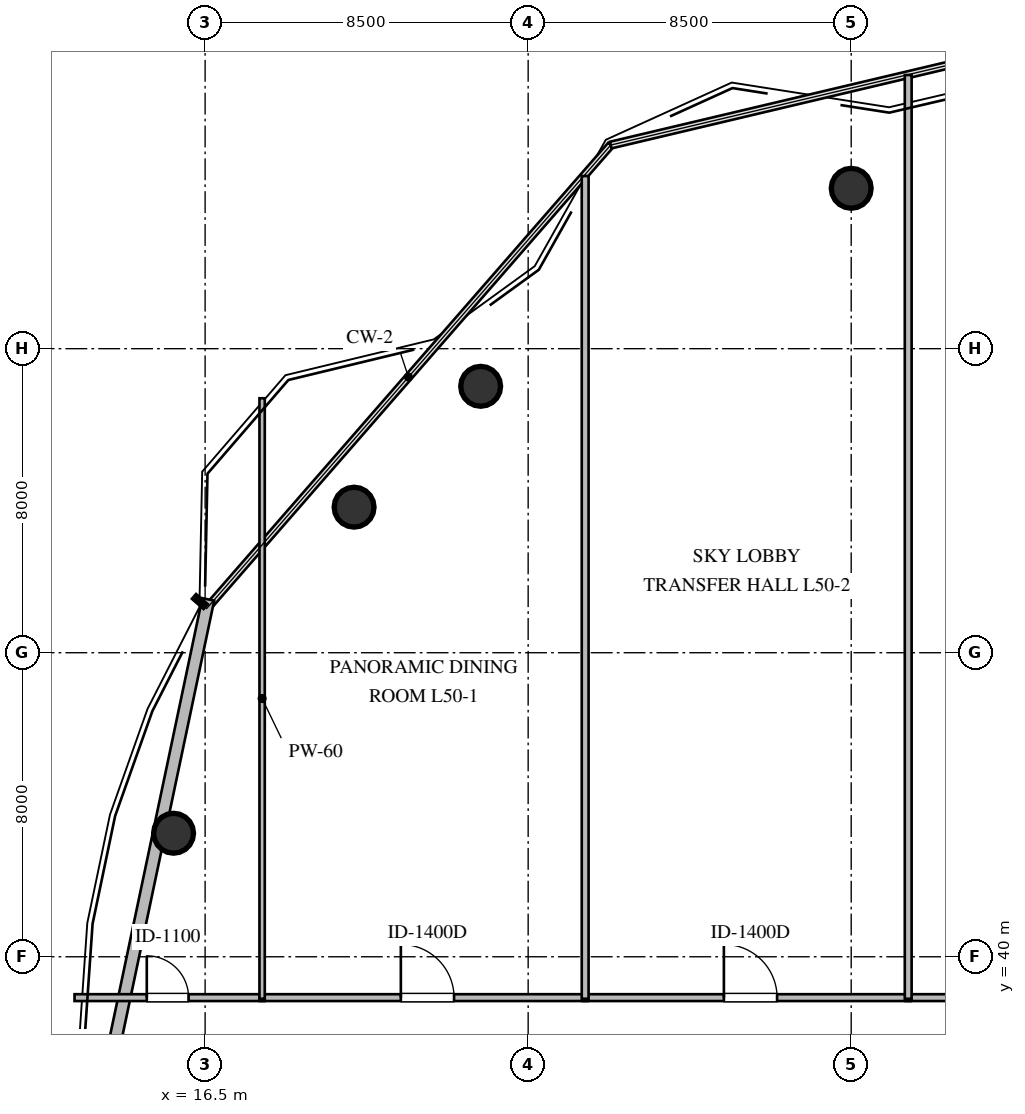
"""IFC4 building model, lengths in metres.
Left out: names, types, materials, properties, quantities, classifications, styles, units other than length and angle.
Written with IfcOpenShell. Run it as: python <this file> out.ifc"""

import sys

from ifc_helpers import new_model, si_unit, direction, frame, frame_2d, origin, origin_2d, place, context, subcontext, project, spatial, rectangle, circle, extrude, element, fill, save


model = new_model("IFC4")
c1 = context("Model", 3, precision=1e-05, world=origin(), true_north=direction((0.0, 1.0)))
c2 = subcontext(c1, "Body", "Model", "MODEL_VIEW")
j1 = project(units=[si_unit("LENGTHUNIT", "METRE"), si_unit("PLANEANGLEUNIT", "RADIAN")], contexts=[c1])
p1 = place(None, origin())
s1 = spatial("IfcSite", under=j1, at=p1, CompositionType="ELEMENT")
p2 = place(p1, origin())
s2 = spatial("IfcBuilding", under=s1, at=p2, CompositionType="ELEMENT")
p3 = place(p2, frame((0.0, 0.0, 190.8)))
s3 = spatial("IfcBuildingStorey", under=s2, at=p3, CompositionType="ELEMENT", Elevation=190.8)
for number, where, z_axis, x_axis in (
    (1, (33.5, 60.22, 0.0), (0.0, 0.0, 1.0), (1.0, 0.0, 0.0)),
    (2, (23.75, 55.01, 0.0), (0.0, 0.0, 1.0), (1.0, 0.0, 0.0)),
    (3, (20.42, 51.83, 0.0), (0.0, 0.0, 1.0), (1.0, 0.0, 0.0)),
    (4, (15.67, 43.25, 0.0), (0.0, 0.0, 1.0), (1.0, 0.0, 0.0)),
):
    element("IfcColumn", number, at=place(p3, frame(where, z_axis=z_axis, x_axis=x_axis)), inside=s3, PredefinedType="COLUMN", context=c2, shape_type="SweptSolid", body=[
        extrude(circle(Radius=0.525, at=origin_2d()), origin(), (0.0, 0.0, 1.0), 4.8),
    ])
p4 = place(p3, frame((13.525, 34.903, 0.0), z_axis=(0.0, 0.0, 1.0), x_axis=(0.206301080321, 0.978488561128, 0.0)))
e5 = element("IfcWall", 5, at=p4, inside=s3, PredefinedType="STANDARD", context=c2, shape_type="SweptSolid", body=[
    extrude(rectangle(XDim=14.819, YDim=0.32, at=frame_2d((7.409, 0.0))), origin(), (0.0, 0.0, 1.0), 4.006),
])
p5 = place(p3, frame((13.064, 38.925, 0.0), z_axis=(0.0, 0.0, 1.0), x_axis=(1.0, 0.0, 0.0)))
e6 = element("IfcWall", 6, at=p5, inside=s3, PredefinedType="PARTITIONING", context=c2, shape_type="SweptSolid", body=[
    extrude(rectangle(XDim=5.001, YDim=0.18, at=frame_2d((2.5, 0.0))), origin(), (0.0, 0.0, 1.0), 4.56),
])
p6 = place(p5, frame((1.901, 0.0, 0.0)))
e7 = element("IfcOpeningElement", 7, at=p6, cuts=e6, PredefinedType="OPENING", context=c2, shape_type="SweptSolid", body=[
    extrude(rectangle(XDim=1.1, YDim=2.1, at=frame_2d((0.55, 1.05))), frame((0.0, 0.1, 0.0), z_axis=(0.0, -1.0, 0.0), x_axis=(1.0, 0.0, 0.0)), (0.0, 0.0, 1.0), 0.2),
])
p7 = place(p3, frame((17.935, 38.925, 0.0), z_axis=(0.0, 0.0, 1.0), x_axis=(1.0, 0.0, 0.0)))
e8 = element("IfcWall", 8, at=p7, inside=s3, PredefinedType="PARTITIONING", context=c2, shape_type="SweptSolid", body=[
    extrude(rectangle(XDim=8.63, YDim=0.18, at=frame_2d((4.315, 0.0))), origin(), (0.0, 0.0, 1.0), 4.56),
])
p8 = place(p7, frame((3.715, 0.0, 0.0)))
e9 = element("IfcOpeningElement", 9, at=p8, cuts=e8, PredefinedType="OPENING", context=c2, shape_type="SweptSolid", body=[
    extrude(rectangle(XDim=1.4, YDim=2.15, at=frame_2d((0.7, 1.075))), frame((0.0, 0.1, 0.0), z_axis=(0.0, -1.0, 0.0), x_axis=(1.0, 0.0, 0.0)), (0.0, 0.0, 1.0), 0.2),
])
p9 = place(p3, frame((26.435, 38.925, 0.0), z_axis=(0.0, 0.0, 1.0), x_axis=(1.0, 0.0, 0.0)))
e10 = element("IfcWall", 10, at=p9, inside=s3, PredefinedType="PARTITIONING", context=c2, shape_type="SweptSolid", body=[
    extrude(rectangle(XDim=8.63, YDim=0.18, at=frame_2d((4.315, 0.0))), origin(), (0.0, 0.0, 1.0), 4.56),
])
p10 = place(p9, frame((3.715, 0.0, 0.0)))
e11 = element("IfcOpeningElement", 11, at=p10, cuts=e10, PredefinedType="OPENING", context=c2, shape_type="SweptSolid", body=[
    extrude(rectangle(XDim=1.4, YDim=2.15, at=frame_2d((0.7, 1.075))), frame((0.0, 0.1, 0.0), z_axis=(0.0, -1.0, 0.0), x_axis=(1.0, 0.0, 0.0)), (0.0, 0.0, 1.0), 0.2),
])
p11 = place(p3, frame((34.935, 38.925, 0.0), z_axis=(0.0, 0.0, 1.0), x_axis=(1.0, 0.0, 0.0)))
e12 = element("IfcWall", 12, at=p11, inside=s3, PredefinedType="PARTITIONING", context=c2, shape_type="SweptSolid", body=[
    extrude(rectangle(XDim=8.63, YDim=0.18, at=frame_2d((4.315, 0.0))), origin(), (0.0, 0.0, 1.0), 4.56),
])
p12 = place(p11, frame((3.715, 0.0, 0.0)))
e13 = element("IfcOpeningElement", 13, at=p12, cuts=e12, PredefinedType="OPENING", context=c2, shape_type="SweptSolid", body=[
    extrude(rectangle(XDim=1.1, YDim=2.1, at=frame_2d((0.55, 1.05))), frame((0.0, 0.1, 0.0), z_axis=(0.0, -1.0, 0.0), x_axis=(1.0, 0.0, 0.0)), (0.0, 0.0, 1.0), 0.2),
])
p13 = place(p3, frame((18.0, 54.696, 0.0), z_axis=(0.0, 0.0, 1.0), x_axis=(0.0, -1.0, 0.0)))
e14 = element("IfcWall", 14, at=p13, inside=s3, PredefinedType="PARTITIONING", context=c2, shape_type="SweptSolid", body=[
    extrude(rectangle(XDim=15.801, YDim=0.14, at=frame_2d((7.9, 0.0))), origin(), (0.0, 0.0, 1.0), 4.56),
])
p14 = place(p3, frame((26.5, 60.543, 0.0), z_axis=(0.0, 0.0, 1.0), x_axis=(0.0, -1.0, 0.0)))
e15 = element("IfcWall", 15, at=p14, inside=s3, PredefinedType="PARTITIONING", context=c2, shape_type="SweptSolid", body=[
    extrude(rectangle(XDim=21.648, YDim=0.18, at=frame_2d((10.824, 0.0))), origin(), (0.0, 0.0, 1.0), 4.56),
])
p15 = place(p3, frame((35.0, 63.201, 0.0), z_axis=(0.0, 0.0, 1.0), x_axis=(0.0, -1.0, 0.0)))
e16 = element("IfcWall", 16, at=p15, inside=s3, PredefinedType="PARTITIONING", context=c2, shape_type="SweptSolid", body=[
    extrude(rectangle(XDim=24.306, YDim=0.18, at=frame_2d((12.153, 0.0))), origin(), (0.0, 0.0, 1.0), 4.006),
])
p16 = place(p6, origin())
e17 = element("IfcDoor", 17, at=p16, inside=s3, OperationType="SINGLE_SWING_LEFT", PredefinedType="DOOR", context=c2, shape_type="SweptSolid", body=[
    extrude(rectangle(XDim=1.1, YDim=2.1, at=frame_2d((0.55, 1.05))), frame((0.0, 0.025, 0.0), z_axis=(0.0, -1.0, 0.0), x_axis=(1.0, 0.0, 0.0)), (0.0, 0.0, 1.0), 0.05),
])
fill(e7, e17)
p17 = place(p8, origin())
e18 = element("IfcDoor", 18, at=p17, inside=s3, OperationType="SINGLE_SWING_LEFT", PredefinedType="DOOR", context=c2, shape_type="SweptSolid", body=[
    extrude(rectangle(XDim=1.4, YDim=2.15, at=frame_2d((0.7, 1.075))), frame((0.0, 0.025, 0.0), z_axis=(0.0, -1.0, 0.0), x_axis=(1.0, 0.0, 0.0)), (0.0, 0.0, 1.0), 0.05),
])
fill(e9, e18)
p18 = place(p10, origin())
e19 = element("IfcDoor", 19, at=p18, inside=s3, OperationType="SINGLE_SWING_LEFT", PredefinedType="DOOR", context=c2, shape_type="SweptSolid", body=[
    extrude(rectangle(XDim=1.4, YDim=2.15, at=frame_2d((0.7, 1.075))), frame((0.0, 0.025, 0.0), z_axis=(0.0, -1.0, 0.0), x_axis=(1.0, 0.0, 0.0)), (0.0, 0.0, 1.0), 0.05),
])
fill(e11, e19)
save(model, sys.argv[1])
